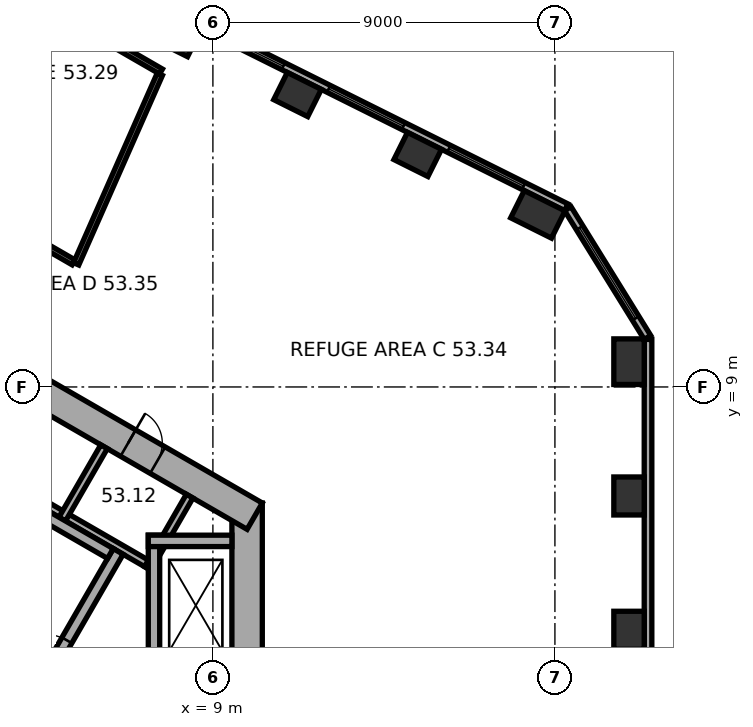
"""IFC4 building model, lengths in metres.
Left out: names, types, materials, properties, quantities, classifications, styles, units other than length and angle.
Written with IfcOpenShell. Run it as: python <this file> out.ifc"""

import sys

from ifc_helpers import new_model, si_unit, direction, frame, frame_2d, origin, origin_2d, place, context, subcontext, project, spatial, rectangle, extrude, element, fill, save


model = new_model("IFC4")
c1 = context("Model", 3, precision=1e-05, world=origin(), true_north=direction((0.0, 1.0)))
c2 = subcontext(c1, "Body", "Model", "MODEL_VIEW")
j1 = project(units=[si_unit("LENGTHUNIT", "METRE"), si_unit("PLANEANGLEUNIT", "RADIAN")], contexts=[c1])
p1 = place(None, origin())
s1 = spatial("IfcSite", under=j1, at=p1, CompositionType="ELEMENT")
p2 = place(p1, origin())
s2 = spatial("IfcBuilding", under=s1, at=p2, CompositionType="ELEMENT")
p3 = place(p2, frame((0.0, 0.0, 214.3)))
s3 = spatial("IfcBuildingStorey", under=s2, at=p3, CompositionType="ELEMENT", Elevation=214.3)
for number, where, z_axis, x_axis in (
    (1, (19.95, 2.598, 0.0), (0.0, 0.0, 1.0), (0.0, 1.0, 0.0)),
    (2, (19.95, 6.132, 0.0), (0.0, 0.0, 1.0), (0.0, 1.0, 0.0)),
):
    element("IfcColumn", number, at=place(p3, frame(where, z_axis=z_axis, x_axis=x_axis)), inside=s3, PredefinedType="COLUMN", context=c2, shape_type="SweptSolid", body=[
        extrude(rectangle(XDim=1.0, YDim=0.8, at=origin_2d()), origin(), (0.0, 0.0, 1.0), 7.4),
    ])
for number, where, z_axis, x_axis in (
    (3, (19.95, 9.665, 0.0), (0.0, 0.0, 1.0), (0.0, 1.0, 0.0)),
    (4, (17.552, 13.541, 0.0), (0.0, 0.0, 1.0), (-0.895, 0.446, 0.0)),
):
    element("IfcColumn", number, at=place(p3, frame(where, z_axis=z_axis, x_axis=x_axis)), inside=s3, PredefinedType="COLUMN", context=c2, shape_type="SweptSolid", body=[
        extrude(rectangle(XDim=1.2, YDim=0.8, at=origin_2d()), origin(), (0.0, 0.0, 1.0), 7.4),
    ])
for number, where, z_axis, x_axis in (
    (5, (14.389, 15.118, 0.0), (0.0, 0.0, 1.0), (-0.895, 0.446, 0.0)),
    (6, (11.227, 16.695, 0.0), (0.0, 0.0, 1.0), (-0.895, 0.446, 0.0)),
    (7, (8.064, 18.271, 0.0), (0.0, 0.0, 1.0), (-0.895, 0.446, 0.0)),
):
    element("IfcColumn", number, at=place(p3, frame(where, z_axis=z_axis, x_axis=x_axis)), inside=s3, PredefinedType="COLUMN", context=c2, shape_type="SweptSolid", body=[
        extrude(rectangle(XDim=1.0, YDim=0.8, at=origin_2d()), origin(), (0.0, 0.0, 1.0), 7.4),
    ])
p4 = place(p3, frame((9.9, -5.947, 0.0), z_axis=(0.0, 0.0, 1.0), x_axis=(0.0, 1.0, 0.0)))
e8 = element("IfcWall", 8, at=p4, inside=s3, PredefinedType="SHEAR", context=c2, shape_type="SweptSolid", body=[
    extrude(rectangle(XDim=11.894, YDim=0.8, at=frame_2d((5.947, 0.0))), origin(), (0.0, 0.0, 1.0), 7.4),
])
p5 = place(p4, frame((6.147, 0.0, 0.0)))
e9 = element("IfcOpeningElement", 9, at=p5, cuts=e8, PredefinedType="OPENING", context=c2, shape_type="SweptSolid", body=[
    extrude(rectangle(XDim=1.5, YDim=2.1, at=frame_2d((0.75, 1.05))), frame((0.0, 0.41, 0.0), z_axis=(0.0, -1.0, 0.0), x_axis=(1.0, 0.0, 0.0)), (0.0, 0.0, 1.0), 0.82),
])
p6 = place(p4, frame((1.697, 0.0, 0.0)))
e10 = element("IfcOpeningElement", 10, at=p6, cuts=e8, PredefinedType="OPENING", context=c2, shape_type="SweptSolid", body=[
    extrude(rectangle(XDim=0.9, YDim=2.1, at=frame_2d((0.45, 1.05))), frame((0.0, 0.41, 0.0), z_axis=(0.0, -1.0, 0.0), x_axis=(1.0, 0.0, 0.0)), (0.0, 0.0, 1.0), 0.82),
])
p7 = place(p4, frame((4.297, 0.0, 0.0)))
e11 = element("IfcOpeningElement", 11, at=p7, cuts=e8, PredefinedType="OPENING", context=c2, shape_type="SweptSolid", body=[
    extrude(rectangle(XDim=0.9, YDim=2.1, at=frame_2d((0.45, 1.05))), frame((0.0, 0.41, 0.0), z_axis=(0.0, -1.0, 0.0), x_axis=(1.0, 0.0, 0.0)), (0.0, 0.0, 1.0), 0.82),
])
p8 = place(p3, frame((10.1, 5.6, 0.0), z_axis=(0.0, 0.0, 1.0), x_axis=(-0.866023897231, 0.500002609418, 0.0)))
e12 = element("IfcWall", 12, at=p8, inside=s3, PredefinedType="SHEAR", context=c2, shape_type="SweptSolid", body=[
    extrude(rectangle(XDim=11.894, YDim=0.8, at=frame_2d((5.947, 0.0))), origin(), (0.0, 0.0, 1.0), 7.4),
])
p9 = place(p8, frame((2.947, 0.0, 0.0)))
e13 = element("IfcOpeningElement", 13, at=p9, cuts=e12, PredefinedType="OPENING", context=c2, shape_type="SweptSolid", body=[
    extrude(rectangle(XDim=0.9, YDim=2.1, at=frame_2d((0.45, 1.05))), frame((0.0, 0.41, 0.0), z_axis=(0.0, -1.0, 0.0), x_axis=(1.0, 0.0, 0.0)), (0.0, 0.0, 1.0), 0.82),
])
p10 = place(p8, frame((6.497, 0.0, 0.0)))
e14 = element("IfcOpeningElement", 14, at=p10, cuts=e12, PredefinedType="OPENING", context=c2, shape_type="SweptSolid", body=[
    extrude(rectangle(XDim=0.9, YDim=2.1, at=frame_2d((0.45, 1.05))), frame((0.0, 0.41, 0.0), z_axis=(0.0, -1.0, 0.0), x_axis=(1.0, 0.0, 0.0)), (0.0, 0.0, 1.0), 0.82),
])
p11 = place(p3, frame((20.45, -8.581, 0.0), z_axis=(0.0, 0.0, 1.0), x_axis=(0.0, 1.0, 0.0)))
e15 = element("IfcWall", 15, at=p11, inside=s3, PredefinedType="STANDARD", context=c2, shape_type="SweptSolid", body=[
    extrude(rectangle(XDim=18.832, YDim=0.2, at=frame_2d((9.416, 0.0))), origin(), (0.0, 0.0, 1.0), 7.4),
])
p12 = place(p3, frame((20.435, 10.304, 0.0), z_axis=(0.0, 0.0, 1.0), x_axis=(-0.526202661606, 0.850359194058, 0.0)))
e16 = element("IfcWall", 16, at=p12, inside=s3, PredefinedType="STANDARD", context=c2, shape_type="SweptSolid", body=[
    extrude(rectangle(XDim=3.983, YDim=0.2, at=frame_2d((1.991, 0.0))), origin(), (0.0, 0.0, 1.0), 7.4),
])
p13 = place(p12, frame((0.591, 0.0, 0.8)))
e17 = element("IfcOpeningElement", 17, at=p13, cuts=e16, PredefinedType="OPENING", context=c2, shape_type="SweptSolid", body=[
    extrude(rectangle(XDim=2.8, YDim=4.2, at=frame_2d((1.4, 2.1))), frame((0.0, 0.11, 0.0), z_axis=(0.0, -1.0, 0.0), x_axis=(1.0, 0.0, 0.0)), (0.0, 0.0, 1.0), 0.22),
])
p14 = place(p3, frame((18.299, 13.727, 0.0), z_axis=(0.0, 0.0, 1.0), x_axis=(-0.894934554817, 0.44619742558, 0.0)))
e18 = element("IfcWall", 18, at=p14, inside=s3, PredefinedType="STANDARD", context=c2, shape_type="SweptSolid", body=[
    extrude(rectangle(XDim=18.841, YDim=0.2, at=frame_2d((9.421, 0.0))), origin(), (0.0, 0.0, 1.0), 7.4),
])
p15 = place(p14, frame((1.253, 0.0, 0.8)))
e19 = element("IfcOpeningElement", 19, at=p15, cuts=e18, PredefinedType="OPENING", context=c2, shape_type="SweptSolid", body=[
    extrude(rectangle(XDim=2.2, YDim=4.2, at=frame_2d((1.1, 2.1))), frame((0.0, 0.11, 0.0), z_axis=(0.0, -1.0, 0.0), x_axis=(1.0, 0.0, 0.0)), (0.0, 0.0, 1.0), 0.22),
])
p16 = place(p14, frame((4.786, 0.0, 0.8)))
e20 = element("IfcOpeningElement", 20, at=p16, cuts=e18, PredefinedType="OPENING", context=c2, shape_type="SweptSolid", body=[
    extrude(rectangle(XDim=2.2, YDim=4.2, at=frame_2d((1.1, 2.1))), frame((0.0, 0.11, 0.0), z_axis=(0.0, -1.0, 0.0), x_axis=(1.0, 0.0, 0.0)), (0.0, 0.0, 1.0), 0.22),
])
p17 = place(p14, frame((8.32, 0.0, 0.8)))
e21 = element("IfcOpeningElement", 21, at=p17, cuts=e18, PredefinedType="OPENING", context=c2, shape_type="SweptSolid", body=[
    extrude(rectangle(XDim=2.2, YDim=4.2, at=frame_2d((1.1, 2.1))), frame((0.0, 0.11, 0.0), z_axis=(0.0, -1.0, 0.0), x_axis=(1.0, 0.0, 0.0)), (0.0, 0.0, 1.0), 0.22),
])
p18 = place(p14, frame((11.854, 0.0, 0.8)))
e22 = element("IfcOpeningElement", 22, at=p18, cuts=e18, PredefinedType="OPENING", context=c2, shape_type="SweptSolid", body=[
    extrude(rectangle(XDim=2.2, YDim=4.2, at=frame_2d((1.1, 2.1))), frame((0.0, 0.11, 0.0), z_axis=(0.0, -1.0, 0.0), x_axis=(1.0, 0.0, 0.0)), (0.0, 0.0, 1.0), 0.22),
])
p19 = place(p14, frame((15.387, 0.0, 0.8)))
e23 = element("IfcOpeningElement", 23, at=p19, cuts=e18, PredefinedType="OPENING", context=c2, shape_type="SweptSolid", body=[
    extrude(rectangle(XDim=2.2, YDim=4.2, at=frame_2d((1.1, 2.1))), frame((0.0, 0.11, 0.0), z_axis=(0.0, -1.0, 0.0), x_axis=(1.0, 0.0, 0.0)), (0.0, 0.0, 1.0), 0.22),
])
p20 = place(p3, frame((7.424, 4.259, 0.0), z_axis=(0.0, 0.0, 1.0), x_axis=(-0.866026010844, 0.49999894854, 0.0)))
e24 = element("IfcWall", 24, at=p20, inside=s3, PredefinedType="PARTITIONING", context=c2, shape_type="SweptSolid", body=[
    extrude(rectangle(XDim=8.0, YDim=0.2, at=frame_2d((4.0, 0.0))), origin(), (0.0, 0.0, 1.0), 7.12),
])
for number, where, z_axis, x_axis in (
    (25, (7.287, 4.222, 0.0), (0.0, 0.0, 1.0), (0.5, 0.866, 0.0)),
    (26, (5.036, 5.522, 0.0), (0.0, 0.0, 1.0), (0.5, 0.866, 0.0)),
):
    element("IfcWall", number, at=place(p3, frame(where, z_axis=z_axis, x_axis=x_axis)), inside=s3, PredefinedType="PARTITIONING", context=c2, shape_type="SweptSolid", body=[
        extrude(rectangle(XDim=2.2, YDim=0.2, at=frame_2d((1.1, 0.0))), origin(), (0.0, 0.0, 1.0), 7.12),
    ])
p21 = place(p3, frame((4.158, 0.602, 0.0), z_axis=(0.0, 0.0, 1.0), x_axis=(0.499977259774, 0.866038532462, 0.0)))
e27 = element("IfcWall", 27, at=p21, inside=s3, PredefinedType="SHEAR", context=c2, shape_type="SweptSolid", body=[
    extrude(rectangle(XDim=4.7, YDim=0.3, at=frame_2d((2.35, 0.0))), origin(), (0.0, 0.0, 1.0), 7.12),
])
p22 = place(p21, frame((0.8, 0.0, 0.0)))
e28 = element("IfcOpeningElement", 28, at=p22, cuts=e27, PredefinedType="OPENING", context=c2, shape_type="SweptSolid", body=[
    extrude(rectangle(XDim=1.2, YDim=2.1, at=frame_2d((0.6, 1.05))), frame((0.0, 0.16, 0.0), z_axis=(0.0, -1.0, 0.0), x_axis=(1.0, 0.0, 0.0)), (0.0, 0.0, 1.0), 0.32),
])
p23 = place(p3, frame((6.303, 4.617, 0.0), z_axis=(0.0, 0.0, 1.0), x_axis=(-0.866027801685, 0.499995846692, 0.0)))
e29 = element("IfcWall", 29, at=p23, inside=s3, PredefinedType="SHEAR", context=c2, shape_type="SweptSolid", body=[
    extrude(rectangle(XDim=7.06, YDim=0.3, at=frame_2d((3.53, 0.0))), origin(), (0.0, 0.0, 1.0), 7.12),
])
p24 = place(p3, frame((7.45, 1.75, 0.0), z_axis=(0.0, 0.0, 1.0), x_axis=(0.0, 1.0, 0.0)))
e30 = element("IfcWall", 30, at=p24, inside=s3, PredefinedType="SHEAR", context=c2, shape_type="SweptSolid", body=[
    extrude(rectangle(XDim=3.35, YDim=0.3, at=frame_2d((1.675, 0.0))), origin(), (0.0, 0.0, 1.0), 7.12),
])
p25 = place(p3, frame((7.3, 4.95, 0.0), z_axis=(0.0, 0.0, 1.0), x_axis=(1.0, 0.0, 0.0)))
e31 = element("IfcWall", 31, at=p25, inside=s3, PredefinedType="SHEAR", context=c2, shape_type="SweptSolid", body=[
    extrude(rectangle(XDim=2.2, YDim=0.3, at=frame_2d((1.1, 0.0))), origin(), (0.0, 0.0, 1.0), 7.12),
])
p26 = place(p3, frame((5.333, 12.279, 0.0), z_axis=(0.0, 0.0, 1.0), x_axis=(-0.86606339888, 0.499934184788, 0.0)))
e32 = element("IfcWall", 32, at=p26, inside=s3, PredefinedType="PARTITIONING", context=c2, shape_type="SweptSolid", body=[
    extrude(rectangle(XDim=6.089, YDim=0.15, at=frame_2d((3.044, 0.0))), origin(), (0.0, 0.0, 1.0), 7.12),
])
p27 = place(p26, frame((4.439, 0.0, 0.0)))
e33 = element("IfcOpeningElement", 33, at=p27, cuts=e32, PredefinedType="OPENING", context=c2, shape_type="SweptSolid", body=[
    extrude(rectangle(XDim=1.4, YDim=2.4, at=frame_2d((0.7, 1.2))), frame((0.0, 0.085, 0.0), z_axis=(0.0, -1.0, 0.0), x_axis=(1.0, 0.0, 0.0)), (0.0, 0.0, 1.0), 0.17),
])
p28 = place(p3, frame((7.603, 17.227, 0.0), z_axis=(0.0, 0.0, 1.0), x_axis=(-0.403743838664, -0.914872074523, 0.0)))
e34 = element("IfcWall", 34, at=p28, inside=s3, PredefinedType="PARTITIONING", context=c2, shape_type="SweptSolid", body=[
    extrude(rectangle(XDim=5.452, YDim=0.15, at=frame_2d((2.726, 0.0))), origin(), (0.0, 0.0, 1.0), 7.12),
])
p29 = place(p3, frame((0.052, 21.678, 0.0), z_axis=(0.0, 0.0, 1.0), x_axis=(0.866021227388, -0.500007233661, 0.0)))
e35 = element("IfcWall", 35, at=p29, inside=s3, PredefinedType="PARTITIONING", context=c2, shape_type="SweptSolid", body=[
    extrude(rectangle(XDim=8.757, YDim=0.15, at=frame_2d((4.378, 0.0))), origin(), (0.0, 0.0, 1.0), 7.12),
])
p30 = place(p13, origin())
e36 = element("IfcWindow", 36, at=p30, inside=s3, PartitioningType="SINGLE_PANEL", PredefinedType="WINDOW", context=c2, shape_type="SweptSolid", body=[
    extrude(rectangle(XDim=2.8, YDim=4.2, at=frame_2d((1.4, 2.1))), frame((0.0, 0.03, 0.0), z_axis=(0.0, -1.0, 0.0), x_axis=(1.0, 0.0, 0.0)), (0.0, 0.0, 1.0), 0.06),
])
fill(e17, e36)
p31 = place(p15, origin())
e37 = element("IfcWindow", 37, at=p31, inside=s3, PartitioningType="SINGLE_PANEL", PredefinedType="WINDOW", context=c2, shape_type="SweptSolid", body=[
    extrude(rectangle(XDim=2.2, YDim=4.2, at=frame_2d((1.1, 2.1))), frame((0.0, 0.03, 0.0), z_axis=(0.0, -1.0, 0.0), x_axis=(1.0, 0.0, 0.0)), (0.0, 0.0, 1.0), 0.06),
])
fill(e19, e37)
p32 = place(p16, origin())
e38 = element("IfcWindow", 38, at=p32, inside=s3, PartitioningType="SINGLE_PANEL", PredefinedType="WINDOW", context=c2, shape_type="SweptSolid", body=[
    extrude(rectangle(XDim=2.2, YDim=4.2, at=frame_2d((1.1, 2.1))), frame((0.0, 0.03, 0.0), z_axis=(0.0, -1.0, 0.0), x_axis=(1.0, 0.0, 0.0)), (0.0, 0.0, 1.0), 0.06),
])
fill(e20, e38)
p33 = place(p17, origin())
e39 = element("IfcWindow", 39, at=p33, inside=s3, PartitioningType="SINGLE_PANEL", PredefinedType="WINDOW", context=c2, shape_type="SweptSolid", body=[
    extrude(rectangle(XDim=2.2, YDim=4.2, at=frame_2d((1.1, 2.1))), frame((0.0, 0.03, 0.0), z_axis=(0.0, -1.0, 0.0), x_axis=(1.0, 0.0, 0.0)), (0.0, 0.0, 1.0), 0.06),
])
fill(e21, e39)
p34 = place(p22, origin())
e40 = element("IfcDoor", 40, at=p34, inside=s3, OperationType="SINGLE_SWING_RIGHT", PredefinedType="DOOR", context=c2, shape_type="SweptSolid", body=[
    extrude(rectangle(XDim=1.2, YDim=2.1, at=frame_2d((0.6, 1.05))), frame((0.0, 0.025, 0.0), z_axis=(0.0, -1.0, 0.0), x_axis=(1.0, 0.0, 0.0)), (0.0, 0.0, 1.0), 0.05),
])
fill(e28, e40)
p35 = place(p9, origin())
e41 = element("IfcDoor", 41, at=p35, inside=s3, OperationType="SINGLE_SWING_LEFT", PredefinedType="DOOR", context=c2, shape_type="SweptSolid", body=[
    extrude(rectangle(XDim=0.9, YDim=2.1, at=frame_2d((0.45, 1.05))), frame((0.0, 0.025, 0.0), z_axis=(0.0, -1.0, 0.0), x_axis=(1.0, 0.0, 0.0)), (0.0, 0.0, 1.0), 0.05),
])
fill(e13, e41)
save(model, sys.argv[1])
